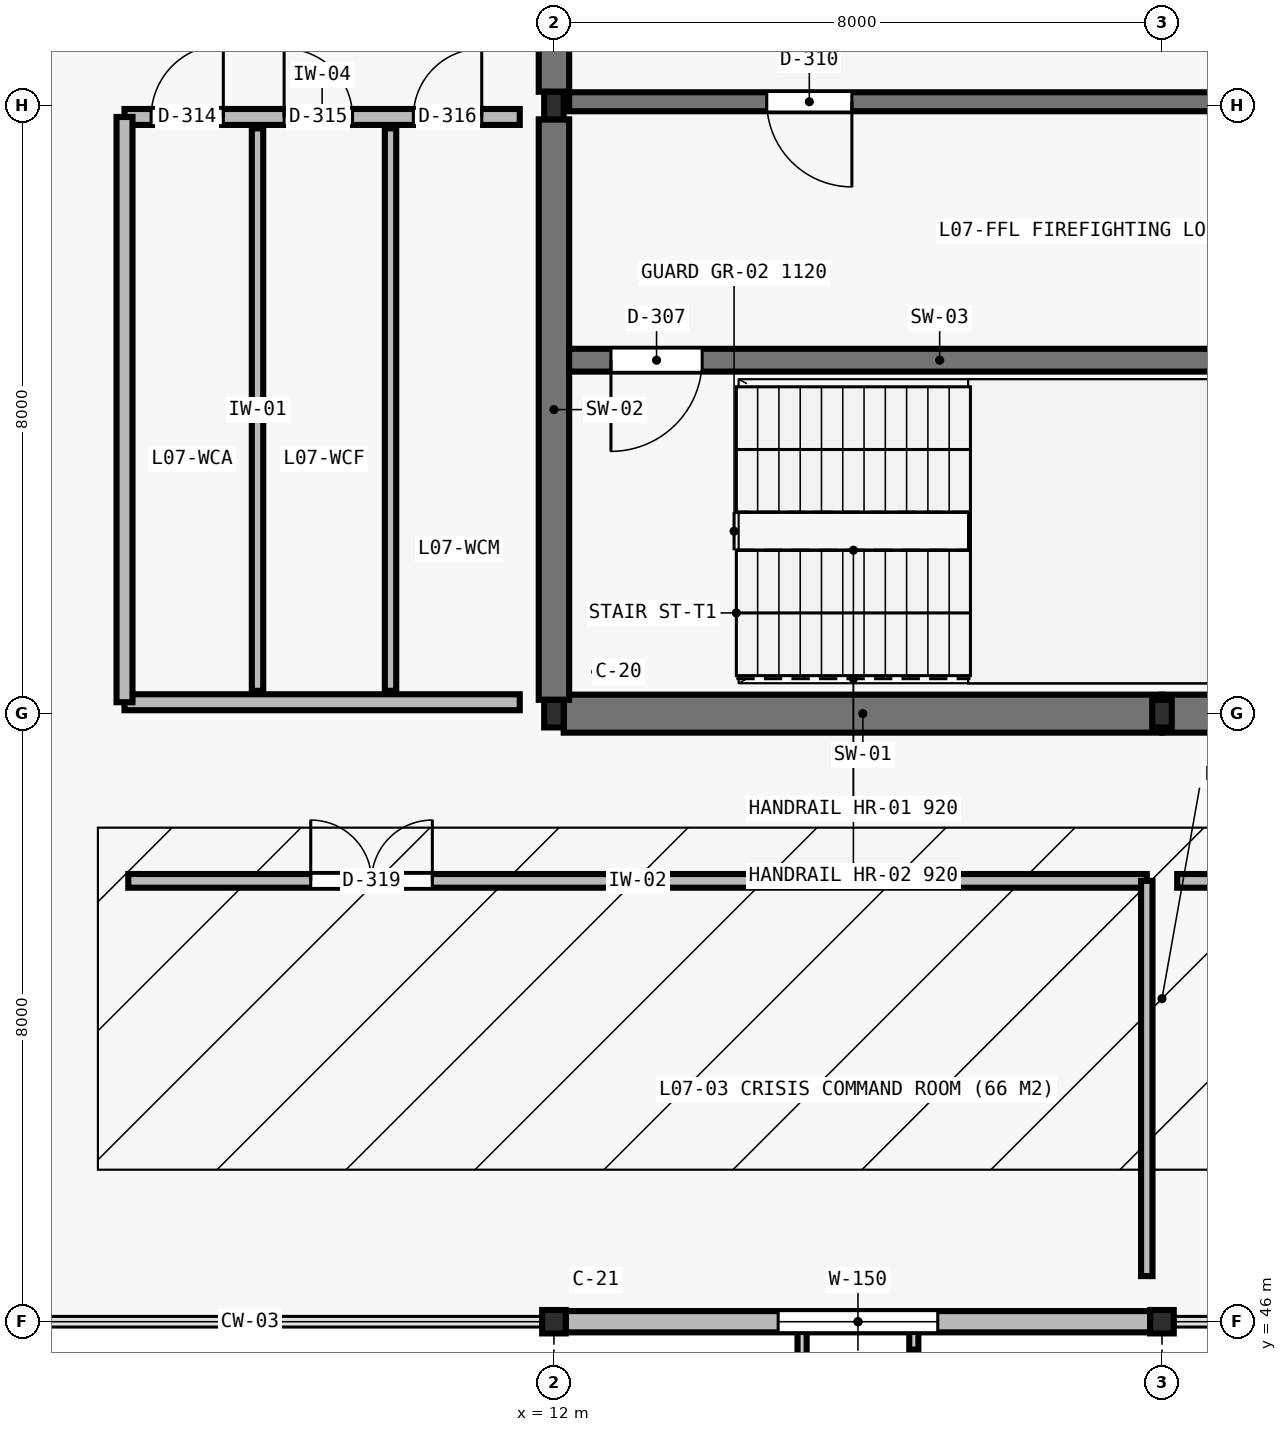
"""IFC4 building model, lengths in metres.
Left out: names, types, materials, properties, quantities, classifications, styles, units other than length and angle.
Written with IfcOpenShell. Run it as: python <this file> out.ifc"""

import sys

from ifc_helpers import new_model, si_unit, direction, frame, frame_2d, origin, origin_2d, place, context, subcontext, project, spatial, rectangle, i_section, extrude, element, fill, save


model = new_model("IFC4")
c1 = context("Model", 3, precision=1e-05, world=origin(), true_north=direction((0.0, 1.0)))
c2 = subcontext(c1, "Body", "Model", "MODEL_VIEW")
j1 = project(units=[si_unit("LENGTHUNIT", "METRE"), si_unit("PLANEANGLEUNIT", "RADIAN")], contexts=[c1])
p1 = place(None, origin())
s1 = spatial("IfcSite", under=j1, at=p1, CompositionType="ELEMENT")
p2 = place(p1, origin())
s2 = spatial("IfcBuilding", under=s1, at=p2, CompositionType="ELEMENT")
p3 = place(p2, frame((0.0, 0.0, 32.2)))
s3 = spatial("IfcBuildingStorey", under=s2, at=p3, CompositionType="ELEMENT", Elevation=32.2)
p4 = place(p3, frame((12.0, 46.0, 0.0), z_axis=(0.0, 0.0, 1.0), x_axis=(1.0, 0.0, 0.0)))
e1 = element("IfcColumn", 1, at=p4, inside=s3, PredefinedType="COLUMN", context=c2, shape_type="SweptSolid", body=[
    extrude(i_section(OverallWidth=0.31, OverallDepth=0.308, WebThickness=0.015, FlangeThickness=0.015, at=origin_2d()), origin(), (0.0, 0.0, 1.0), 3.96),
])
for number, where, z_axis, x_axis in (
    (2, (12.0, 54.0, 0.0), (0.0, 0.0, 1.0), (1.0, 0.0, 0.0)),
    (3, (12.0, 62.0, 0.0), (0.0, 0.0, 1.0), (1.0, 0.0, 0.0)),
):
    element("IfcColumn", number, at=place(p3, frame(where, z_axis=z_axis, x_axis=x_axis)), inside=s3, PredefinedType="COLUMN", context=c2, shape_type="SweptSolid", body=[
        extrude(i_section(OverallWidth=0.257, OverallDepth=0.363, WebThickness=0.013, FlangeThickness=0.022, at=origin_2d()), origin(), (0.0, 0.0, 1.0), 3.96),
    ])
p5 = place(p3, frame((20.0, 46.0, 0.0), z_axis=(0.0, 0.0, 1.0), x_axis=(1.0, 0.0, 0.0)))
e4 = element("IfcColumn", 4, at=p5, inside=s3, PredefinedType="COLUMN", context=c2, shape_type="SweptSolid", body=[
    extrude(i_section(OverallWidth=0.31, OverallDepth=0.308, WebThickness=0.015, FlangeThickness=0.015, at=origin_2d()), origin(), (0.0, 0.0, 1.0), 3.96),
])
p6 = place(p3, frame((20.0, 54.0, 0.0), z_axis=(0.0, 0.0, 1.0), x_axis=(1.0, 0.0, 0.0)))
e5 = element("IfcColumn", 5, at=p6, inside=s3, PredefinedType="COLUMN", context=c2, shape_type="SweptSolid", body=[
    extrude(i_section(OverallWidth=0.257, OverallDepth=0.363, WebThickness=0.013, FlangeThickness=0.022, at=origin_2d()), origin(), (0.0, 0.0, 1.0), 3.96),
])
p7 = place(p3, frame((12.128, 54.0, 0.0), z_axis=(0.0, 0.0, 1.0), x_axis=(1.0, 0.0, 0.0)))
e6 = element("IfcWall", 6, at=p7, inside=s3, PredefinedType="SHEAR", context=c2, shape_type="SweptSolid", body=[
    extrude(rectangle(XDim=7.872, YDim=0.5, at=frame_2d((3.936, 0.0))), origin(), (0.0, 0.0, 1.0), 3.96),
])
p8 = place(p3, frame((20.0, 54.0, 0.0), z_axis=(0.0, 0.0, 1.0), x_axis=(1.0, 0.0, 0.0)))
e7 = element("IfcWall", 7, at=p8, inside=s3, PredefinedType="SHEAR", context=c2, shape_type="SweptSolid", body=[
    extrude(rectangle(XDim=8.0, YDim=0.5, at=frame_2d((4.0, 0.0))), origin(), (0.0, 0.0, 1.0), 3.96),
])
p9 = place(p3, frame((12.0, 54.181, 0.0), z_axis=(0.0, 0.0, 1.0), x_axis=(0.0, 1.0, 0.0)))
e8 = element("IfcWall", 8, at=p9, inside=s3, PredefinedType="SHEAR", context=c2, shape_type="SweptSolid", body=[
    extrude(rectangle(XDim=7.637, YDim=0.4, at=frame_2d((3.819, 0.0))), origin(), (0.0, 0.0, 1.0), 3.96),
])
p10 = place(p3, frame((12.0, 62.181, 0.0), z_axis=(0.0, 0.0, 1.0), x_axis=(0.0, 1.0, 0.0)))
e9 = element("IfcWall", 9, at=p10, inside=s3, PredefinedType="SHEAR", context=c2, shape_type="SweptSolid", body=[
    extrude(rectangle(XDim=7.637, YDim=0.4, at=frame_2d((3.819, 0.0))), origin(), (0.0, 0.0, 1.0), 3.96),
])
p11 = place(p10, frame((0.718, 0.0, 0.0)))
e10 = element("IfcOpeningElement", 10, at=p11, cuts=e9, PredefinedType="OPENING", context=c2, shape_type="SweptSolid", body=[
    extrude(rectangle(XDim=1.8, YDim=2.2, at=frame_2d((0.9, 1.1))), frame((0.0, 0.21, 0.0), z_axis=(0.0, -1.0, 0.0), x_axis=(1.0, 0.0, 0.0)), (0.0, 0.0, 1.0), 0.42),
])
p12 = place(p3, frame((12.2, 58.65, 0.0), z_axis=(0.0, 0.0, 1.0), x_axis=(1.0, 0.0, 0.0)))
e11 = element("IfcWall", 11, at=p12, inside=s3, PredefinedType="SHEAR", context=c2, shape_type="SweptSolid", body=[
    extrude(rectangle(XDim=9.75, YDim=0.3, at=frame_2d((4.875, 0.0))), origin(), (0.0, 0.0, 1.0), 3.96),
])
p13 = place(p12, frame((0.55, 0.0, 0.0)))
e12 = element("IfcOpeningElement", 12, at=p13, cuts=e11, PredefinedType="OPENING", context=c2, shape_type="SweptSolid", body=[
    extrude(rectangle(XDim=1.2, YDim=2.2, at=frame_2d((0.6, 1.1))), frame((0.0, 0.16, 0.0), z_axis=(0.0, -1.0, 0.0), x_axis=(1.0, 0.0, 0.0)), (0.0, 0.0, 1.0), 0.32),
])
p14 = place(p3, frame((12.2, 62.05, 0.0), z_axis=(0.0, 0.0, 1.0), x_axis=(1.0, 0.0, 0.0)))
e13 = element("IfcWall", 13, at=p14, inside=s3, PredefinedType="SHEAR", context=c2, shape_type="SweptSolid", body=[
    extrude(rectangle(XDim=16.55, YDim=0.25, at=frame_2d((8.275, 0.0))), origin(), (0.0, 0.0, 1.0), 3.96),
])
p15 = place(p14, frame((2.6, 0.0, 0.0)))
e14 = element("IfcOpeningElement", 14, at=p15, cuts=e13, PredefinedType="OPENING", context=c2, shape_type="SweptSolid", body=[
    extrude(rectangle(XDim=1.12, YDim=2.22, at=frame_2d((0.56, 1.11))), frame((0.0, 0.135, 0.0), z_axis=(0.0, -1.0, 0.0), x_axis=(1.0, 0.0, 0.0)), (0.0, 0.0, 1.0), 0.27),
])
p16 = place(p14, frame((11.2, 0.0, 0.0)))
e15 = element("IfcOpeningElement", 15, at=p16, cuts=e13, PredefinedType="OPENING", context=c2, shape_type="SweptSolid", body=[
    extrude(rectangle(XDim=1.12, YDim=2.22, at=frame_2d((0.56, 1.11))), frame((0.0, 0.135, 0.0), z_axis=(0.0, -1.0, 0.0), x_axis=(1.0, 0.0, 0.0)), (0.0, 0.0, 1.0), 0.27),
])
p17 = place(p3, frame((19.845, 46.0, 0.0), z_axis=(0.0, 0.0, 1.0), x_axis=(-1.0, 0.0, 0.0)))
e16 = element("IfcWall", 16, at=p17, inside=s3, PredefinedType="STANDARD", context=c2, shape_type="SweptSolid", body=[
    extrude(rectangle(XDim=7.69, YDim=0.28, at=frame_2d((3.845, 0.0))), origin(), (0.0, 0.0, 1.0), 3.55),
])
p18 = place(p17, frame((2.795, 0.0, 0.95)))
e17 = element("IfcOpeningElement", 17, at=p18, cuts=e16, PredefinedType="OPENING", context=c2, shape_type="SweptSolid", body=[
    extrude(rectangle(XDim=2.1, YDim=2.1, at=frame_2d((1.05, 1.05))), frame((0.0, 0.15, 0.0), z_axis=(0.0, -1.0, 0.0), x_axis=(1.0, 0.0, 0.0)), (0.0, 0.0, 1.0), 0.3),
])
p19 = place(p3, frame((6.35, 61.85, 0.0), z_axis=(0.0, 0.0, 1.0), x_axis=(1.0, 0.0, 0.0)))
e18 = element("IfcWall", 18, at=p19, inside=s3, PredefinedType="PLUMBINGWALL", context=c2, shape_type="SweptSolid", body=[
    extrude(rectangle(XDim=5.2, YDim=0.21, at=frame_2d((2.6, 0.0))), origin(), (0.0, 0.0, 1.0), 3.96),
])
p20 = place(p19, frame((0.35, 0.0, 0.0)))
e19 = element("IfcOpeningElement", 19, at=p20, cuts=e18, PredefinedType="OPENING", context=c2, shape_type="SweptSolid", body=[
    extrude(rectangle(XDim=0.95, YDim=2.1, at=frame_2d((0.475, 1.05))), frame((0.0, 0.115, 0.0), z_axis=(0.0, -1.0, 0.0), x_axis=(1.0, 0.0, 0.0)), (0.0, 0.0, 1.0), 0.23),
])
p21 = place(p19, frame((2.1, 0.0, 0.0)))
e20 = element("IfcOpeningElement", 20, at=p21, cuts=e18, PredefinedType="OPENING", context=c2, shape_type="SweptSolid", body=[
    extrude(rectangle(XDim=0.9, YDim=2.1, at=frame_2d((0.45, 1.05))), frame((0.0, 0.115, 0.0), z_axis=(0.0, -1.0, 0.0), x_axis=(1.0, 0.0, 0.0)), (0.0, 0.0, 1.0), 0.23),
])
p22 = place(p19, frame((3.8, 0.0, 0.0)))
e21 = element("IfcOpeningElement", 21, at=p22, cuts=e18, PredefinedType="OPENING", context=c2, shape_type="SweptSolid", body=[
    extrude(rectangle(XDim=0.9, YDim=2.1, at=frame_2d((0.45, 1.05))), frame((0.0, 0.115, 0.0), z_axis=(0.0, -1.0, 0.0), x_axis=(1.0, 0.0, 0.0)), (0.0, 0.0, 1.0), 0.23),
])
p23 = place(p3, frame((6.35, 54.15, 0.0), z_axis=(0.0, 0.0, 1.0), x_axis=(1.0, 0.0, 0.0)))
e22 = element("IfcWall", 22, at=p23, inside=s3, PredefinedType="PLUMBINGWALL", context=c2, shape_type="SweptSolid", body=[
    extrude(rectangle(XDim=5.2, YDim=0.21, at=frame_2d((2.6, 0.0))), origin(), (0.0, 0.0, 1.0), 3.96),
])
p24 = place(p3, frame((6.35, 54.15, 0.0), z_axis=(0.0, 0.0, 1.0), x_axis=(0.0, 1.0, 0.0)))
e23 = element("IfcWall", 23, at=p24, inside=s3, PredefinedType="PLUMBINGWALL", context=c2, shape_type="SweptSolid", body=[
    extrude(rectangle(XDim=7.7, YDim=0.21, at=frame_2d((3.85, 0.0))), origin(), (0.0, 0.0, 1.0), 3.96),
])
for number, where, z_axis, x_axis in (
    (24, (8.1, 54.3, 0.0), (0.0, 0.0, 1.0), (0.0, 1.0, 0.0)),
    (25, (9.85, 54.3, 0.0), (0.0, 0.0, 1.0), (0.0, 1.0, 0.0)),
):
    element("IfcWall", number, at=place(p3, frame(where, z_axis=z_axis, x_axis=x_axis)), inside=s3, PredefinedType="PARTITIONING", context=c2, shape_type="SweptSolid", body=[
        extrude(rectangle(XDim=7.4, YDim=0.15, at=frame_2d((3.7, 0.0))), origin(), (0.0, 0.0, 1.0), 3.96),
    ])
p25 = place(p3, frame((6.4, 51.8, 0.0), z_axis=(0.0, 0.0, 1.0), x_axis=(1.0, 0.0, 0.0)))
e26 = element("IfcWall", 26, at=p25, inside=s3, PredefinedType="PARTITIONING", context=c2, shape_type="SweptSolid", body=[
    extrude(rectangle(XDim=13.4, YDim=0.18, at=frame_2d((6.7, 0.0))), origin(), (0.0, 0.0, 1.0), 3.96),
])
p26 = place(p25, frame((2.4, 0.0, 0.0)))
e27 = element("IfcOpeningElement", 27, at=p26, cuts=e26, PredefinedType="OPENING", context=c2, shape_type="SweptSolid", body=[
    extrude(rectangle(XDim=1.6, YDim=2.2, at=frame_2d((0.8, 1.1))), frame((0.0, 0.1, 0.0), z_axis=(0.0, -1.0, 0.0), x_axis=(1.0, 0.0, 0.0)), (0.0, 0.0, 1.0), 0.2),
])
p27 = place(p3, frame((19.8, 46.6, 0.0), z_axis=(0.0, 0.0, 1.0), x_axis=(0.0, 1.0, 0.0)))
e28 = element("IfcWall", 28, at=p27, inside=s3, PredefinedType="PARTITIONING", context=c2, shape_type="SweptSolid", body=[
    extrude(rectangle(XDim=5.2, YDim=0.15, at=frame_2d((2.6, 0.0))), origin(), (0.0, 0.0, 1.0), 3.96),
])
p28 = place(p3, frame((20.2, 51.8, 0.0), z_axis=(0.0, 0.0, 1.0), x_axis=(1.0, 0.0, 0.0)))
e29 = element("IfcWall", 29, at=p28, inside=s3, PredefinedType="PARTITIONING", context=c2, shape_type="SweptSolid", body=[
    extrude(rectangle(XDim=15.2, YDim=0.18, at=frame_2d((7.6, 0.0))), origin(), (0.0, 0.0, 1.0), 3.96),
])
p29 = place(p28, frame((2.6, 0.0, 0.0)))
e30 = element("IfcOpeningElement", 30, at=p29, cuts=e29, PredefinedType="OPENING", context=c2, shape_type="SweptSolid", body=[
    extrude(rectangle(XDim=0.95, YDim=2.1, at=frame_2d((0.475, 1.05))), frame((0.0, 0.1, 0.0), z_axis=(0.0, -1.0, 0.0), x_axis=(1.0, 0.0, 0.0)), (0.0, 0.0, 1.0), 0.2),
])
p30 = place(p18, origin())
e31 = element("IfcWindow", 31, at=p30, inside=s3, PartitioningType="SINGLE_PANEL", PredefinedType="WINDOW", context=c2, shape_type="SweptSolid", body=[
    extrude(rectangle(XDim=2.1, YDim=2.1, at=frame_2d((1.05, 1.05))), frame((0.0, 0.03, 0.0), z_axis=(0.0, -1.0, 0.0), x_axis=(1.0, 0.0, 0.0)), (0.0, 0.0, 1.0), 0.06),
])
fill(e17, e31)
p31 = place(p13, frame((1.2, 0.0, 0.0), z_axis=(0.0, 0.0, 1.0), x_axis=(-1.0, 0.0, 0.0)))
e32 = element("IfcDoor", 32, at=p31, inside=s3, OperationType="SINGLE_SWING_RIGHT", PredefinedType="DOOR", context=c2, shape_type="SweptSolid", body=[
    extrude(rectangle(XDim=1.2, YDim=2.2, at=frame_2d((0.6, 1.1))), frame((0.0, 0.025, 0.0), z_axis=(0.0, -1.0, 0.0), x_axis=(1.0, 0.0, 0.0)), (0.0, 0.0, 1.0), 0.05),
])
fill(e12, e32)
p32 = place(p15, frame((1.12, 0.0, 0.0), z_axis=(0.0, 0.0, 1.0), x_axis=(-1.0, 0.0, 0.0)))
e33 = element("IfcDoor", 33, at=p32, inside=s3, OperationType="SINGLE_SWING_LEFT", PredefinedType="DOOR", context=c2, shape_type="SweptSolid", body=[
    extrude(rectangle(XDim=1.12, YDim=2.22, at=frame_2d((0.56, 1.11))), frame((0.0, 0.025, 0.0), z_axis=(0.0, -1.0, 0.0), x_axis=(1.0, 0.0, 0.0)), (0.0, 0.0, 1.0), 0.05),
])
fill(e14, e33)
p33 = place(p20, origin())
e34 = element("IfcDoor", 34, at=p33, inside=s3, OperationType="SINGLE_SWING_RIGHT", PredefinedType="DOOR", context=c2, shape_type="SweptSolid", body=[
    extrude(rectangle(XDim=0.95, YDim=2.1, at=frame_2d((0.475, 1.05))), frame((0.0, 0.025, 0.0), z_axis=(0.0, -1.0, 0.0), x_axis=(1.0, 0.0, 0.0)), (0.0, 0.0, 1.0), 0.05),
])
fill(e19, e34)
p34 = place(p21, origin())
e35 = element("IfcDoor", 35, at=p34, inside=s3, OperationType="SINGLE_SWING_LEFT", PredefinedType="DOOR", context=c2, shape_type="SweptSolid", body=[
    extrude(rectangle(XDim=0.9, YDim=2.1, at=frame_2d((0.45, 1.05))), frame((0.0, 0.025, 0.0), z_axis=(0.0, -1.0, 0.0), x_axis=(1.0, 0.0, 0.0)), (0.0, 0.0, 1.0), 0.05),
])
fill(e20, e35)
p35 = place(p22, origin())
e36 = element("IfcDoor", 36, at=p35, inside=s3, OperationType="SINGLE_SWING_RIGHT", PredefinedType="DOOR", context=c2, shape_type="SweptSolid", body=[
    extrude(rectangle(XDim=0.9, YDim=2.1, at=frame_2d((0.45, 1.05))), frame((0.0, 0.025, 0.0), z_axis=(0.0, -1.0, 0.0), x_axis=(1.0, 0.0, 0.0)), (0.0, 0.0, 1.0), 0.05),
])
fill(e21, e36)
p36 = place(p26, origin())
e37 = element("IfcDoor", 37, at=p36, inside=s3, OperationType="DOUBLE_DOOR_SINGLE_SWING", PredefinedType="DOOR", context=c2, shape_type="SweptSolid", body=[
    extrude(rectangle(XDim=1.6, YDim=2.2, at=frame_2d((0.8, 1.1))), frame((0.0, 0.025, 0.0), z_axis=(0.0, -1.0, 0.0), x_axis=(1.0, 0.0, 0.0)), (0.0, 0.0, 1.0), 0.05),
])
fill(e27, e37)
save(model, sys.argv[1])
